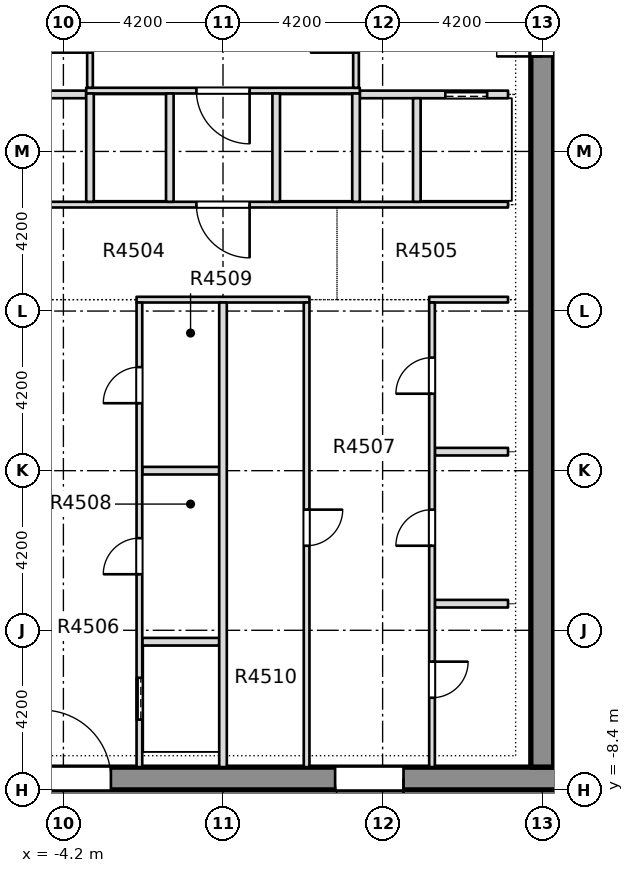
"""IFC4 building model, lengths in metres.
Left out: names, types, materials, properties, quantities, classifications, styles, units other than length and angle.
Written with IfcOpenShell. Run it as: python <this file> out.ifc"""

import sys

from ifc_helpers import new_model, si_unit, direction, frame, frame_2d, origin, place, context, subcontext, project, spatial, rectangle, extrude, element, fill, save


model = new_model("IFC4")
c1 = context("Model", 3, precision=1e-05, world=origin(), true_north=direction((0.0, 1.0)))
c2 = subcontext(c1, "Body", "Model", "MODEL_VIEW")
j1 = project(units=[si_unit("LENGTHUNIT", "METRE"), si_unit("PLANEANGLEUNIT", "RADIAN")], contexts=[c1])
p1 = place(None, origin())
s1 = spatial("IfcSite", under=j1, at=p1, CompositionType="ELEMENT")
p2 = place(p1, origin())
s2 = spatial("IfcBuilding", under=s1, at=p2, CompositionType="ELEMENT")
p3 = place(p2, frame((0.0, 0.0, 175.55)))
s3 = spatial("IfcBuildingStorey", under=s2, at=p3, CompositionType="ELEMENT", Elevation=175.55)
p4 = place(p3, frame((-12.0, -8.1, -0.4), z_axis=(0.0, 0.0, 1.0), x_axis=(1.0, 0.0, 0.0)))
e1 = element("IfcWall", 1, at=p4, inside=s3, PredefinedType="SHEAR", context=c2, shape_type="SweptSolid", body=[
    extrude(rectangle(XDim=24.0, YDim=0.6, at=frame_2d((12.0, 0.0))), origin(), (0.0, 0.0, 1.0), 3.45),
])
p5 = place(p4, frame((7.25, 0.0, 0.4)))
e2 = element("IfcOpeningElement", 2, at=p5, cuts=e1, PredefinedType="OPENING", context=c2, shape_type="SweptSolid", body=[
    extrude(rectangle(XDim=1.8, YDim=2.1, at=frame_2d((0.9, 1.05))), frame((0.0, 0.31, 0.0), z_axis=(0.0, -1.0, 0.0), x_axis=(1.0, 0.0, 0.0)), (0.0, 0.0, 1.0), 0.62),
])
p6 = place(p4, frame((14.95, 0.0, 0.4)))
e3 = element("IfcOpeningElement", 3, at=p6, cuts=e1, PredefinedType="OPENING", context=c2, shape_type="SweptSolid", body=[
    extrude(rectangle(XDim=1.8, YDim=2.1, at=frame_2d((0.9, 1.05))), frame((0.0, 0.31, 0.0), z_axis=(0.0, -1.0, 0.0), x_axis=(1.0, 0.0, 0.0)), (0.0, 0.0, 1.0), 0.62),
])
p7 = place(p3, frame((8.4, -7.8, -0.4), z_axis=(0.0, 0.0, 1.0), x_axis=(0.0, 1.0, 0.0)))
e4 = element("IfcWall", 4, at=p7, inside=s3, PredefinedType="SHEAR", context=c2, shape_type="SweptSolid", body=[
    extrude(rectangle(XDim=28.95, YDim=0.6, at=frame_2d((14.475, 0.0))), origin(), (0.0, 0.0, 1.0), 3.45),
])
p8 = place(p7, frame((18.7, 0.0, 0.4)))
e5 = element("IfcOpeningElement", 5, at=p8, cuts=e4, PredefinedType="OPENING", context=c2, shape_type="SweptSolid", body=[
    extrude(rectangle(XDim=1.2, YDim=2.1, at=frame_2d((0.6, 1.05))), frame((0.0, 0.31, 0.0), z_axis=(0.0, -1.0, 0.0), x_axis=(1.0, 0.0, 0.0)), (0.0, 0.0, 1.0), 0.62),
])
p9 = place(p3, frame((-2.125, -4.5, 0.0), z_axis=(0.0, 0.0, 1.0), x_axis=(1.0, 0.0, 0.0)))
e6 = element("IfcWall", 6, at=p9, inside=s3, PredefinedType="PARTITIONING", context=c2, shape_type="SweptSolid", body=[
    extrude(rectangle(XDim=2.025, YDim=0.2, at=frame_2d((1.012, 0.0))), origin(), (0.0, 0.0, 1.0), 3.05),
])
p10 = place(p3, frame((5.575, -3.5, 0.0), z_axis=(0.0, 0.0, 1.0), x_axis=(1.0, 0.0, 0.0)))
e7 = element("IfcWall", 7, at=p10, inside=s3, PredefinedType="PARTITIONING", context=c2, shape_type="SweptSolid", body=[
    extrude(rectangle(XDim=1.925, YDim=0.2, at=frame_2d((0.962, 0.0))), origin(), (0.0, 0.0, 1.0), 3.05),
])
p11 = place(p3, frame((-2.125, 0.0, 0.0), z_axis=(0.0, 0.0, 1.0), x_axis=(1.0, 0.0, 0.0)))
e8 = element("IfcWall", 8, at=p11, inside=s3, PredefinedType="PARTITIONING", context=c2, shape_type="SweptSolid", body=[
    extrude(rectangle(XDim=2.025, YDim=0.2, at=frame_2d((1.012, 0.0))), origin(), (0.0, 0.0, 1.0), 3.05),
])
p12 = place(p3, frame((5.575, 0.5, 0.0), z_axis=(0.0, 0.0, 1.0), x_axis=(1.0, 0.0, 0.0)))
e9 = element("IfcWall", 9, at=p12, inside=s3, PredefinedType="PARTITIONING", context=c2, shape_type="SweptSolid", body=[
    extrude(rectangle(XDim=1.925, YDim=0.2, at=frame_2d((0.962, 0.0))), origin(), (0.0, 0.0, 1.0), 3.05),
])
p13 = place(p3, frame((-2.275, 4.5, 0.0), z_axis=(0.0, 0.0, 1.0), x_axis=(1.0, 0.0, 0.0)))
e10 = element("IfcWall", 10, at=p13, inside=s3, PredefinedType="PARTITIONING", context=c2, shape_type="SweptSolid", body=[
    extrude(rectangle(XDim=4.55, YDim=0.15, at=frame_2d((2.275, 0.0))), origin(), (0.0, 0.0, 1.0), 3.05),
])
p14 = place(p3, frame((5.425, 4.5, 0.0), z_axis=(0.0, 0.0, 1.0), x_axis=(1.0, 0.0, 0.0)))
e11 = element("IfcWall", 11, at=p14, inside=s3, PredefinedType="PARTITIONING", context=c2, shape_type="SweptSolid", body=[
    extrude(rectangle(XDim=2.075, YDim=0.15, at=frame_2d((1.038, 0.0))), origin(), (0.0, 0.0, 1.0), 3.05),
])
p15 = place(p3, frame((-7.5, 7.0, 0.0), z_axis=(0.0, 0.0, 1.0), x_axis=(1.0, 0.0, 0.0)))
e12 = element("IfcWall", 12, at=p15, inside=s3, PredefinedType="PARTITIONING", context=c2, shape_type="SweptSolid", body=[
    extrude(rectangle(XDim=15.0, YDim=0.15, at=frame_2d((7.5, 0.0))), origin(), (0.0, 0.0, 1.0), 3.05),
])
p16 = place(p15, frame((6.8, 0.0, 0.0)))
e13 = element("IfcOpeningElement", 13, at=p16, cuts=e12, PredefinedType="OPENING", context=c2, shape_type="SweptSolid", body=[
    extrude(rectangle(XDim=1.4, YDim=2.1, at=frame_2d((0.7, 1.05))), frame((0.0, 0.085, 0.0), z_axis=(0.0, -1.0, 0.0), x_axis=(1.0, 0.0, 0.0)), (0.0, 0.0, 1.0), 0.17),
])
p17 = place(p3, frame((-7.5, 9.9, 0.0), z_axis=(0.0, 0.0, 1.0), x_axis=(1.0, 0.0, 0.0)))
e14 = element("IfcWall", 14, at=p17, inside=s3, PredefinedType="PARTITIONING", context=c2, shape_type="SweptSolid", body=[
    extrude(rectangle(XDim=3.9, YDim=0.2, at=frame_2d((1.95, 0.0))), origin(), (0.0, 0.0, 1.0), 3.05),
])
p18 = place(p17, frame((0.55, 0.0, 0.0)))
e15 = element("IfcOpeningElement", 15, at=p18, cuts=e14, PredefinedType="OPENING", context=c2, shape_type="SweptSolid", body=[
    extrude(rectangle(XDim=1.1, YDim=2.1, at=frame_2d((0.55, 1.05))), frame((0.0, 0.11, 0.0), z_axis=(0.0, -1.0, 0.0), x_axis=(1.0, 0.0, 0.0)), (0.0, 0.0, 1.0), 0.22),
])
p19 = place(p3, frame((3.6, 9.9, 0.0), z_axis=(0.0, 0.0, 1.0), x_axis=(1.0, 0.0, 0.0)))
e16 = element("IfcWall", 16, at=p19, inside=s3, PredefinedType="PARTITIONING", context=c2, shape_type="SweptSolid", body=[
    extrude(rectangle(XDim=3.9, YDim=0.2, at=frame_2d((1.95, 0.0))), origin(), (0.0, 0.0, 1.0), 3.05),
])
p20 = place(p19, frame((2.25, 0.0, 0.0)))
e17 = element("IfcOpeningElement", 17, at=p20, cuts=e16, PredefinedType="OPENING", context=c2, shape_type="SweptSolid", body=[
    extrude(rectangle(XDim=1.1, YDim=2.1, at=frame_2d((0.55, 1.05))), frame((0.0, 0.11, 0.0), z_axis=(0.0, -1.0, 0.0), x_axis=(1.0, 0.0, 0.0)), (0.0, 0.0, 1.0), 0.22),
])
p21 = place(p3, frame((-3.6, 10.0, 0.0), z_axis=(0.0, 0.0, 1.0), x_axis=(1.0, 0.0, 0.0)))
e18 = element("IfcWall", 18, at=p21, inside=s3, PredefinedType="PARTITIONING", context=c2, shape_type="SweptSolid", body=[
    extrude(rectangle(XDim=7.2, YDim=0.15, at=frame_2d((3.6, 0.0))), origin(), (0.0, 0.0, 1.0), 3.05),
])
p22 = place(p21, frame((2.9, 0.0, 0.0)))
e19 = element("IfcOpeningElement", 19, at=p22, cuts=e18, PredefinedType="OPENING", context=c2, shape_type="SweptSolid", body=[
    extrude(rectangle(XDim=1.4, YDim=2.1, at=frame_2d((0.7, 1.05))), frame((0.0, 0.085, 0.0), z_axis=(0.0, -1.0, 0.0), x_axis=(1.0, 0.0, 0.0)), (0.0, 0.0, 1.0), 0.17),
])
p23 = place(p3, frame((-3.5, 7.075, 0.0), z_axis=(0.0, 0.0, 1.0), x_axis=(0.0, 1.0, 0.0)))
e20 = element("IfcWall", 20, at=p23, inside=s3, PredefinedType="PARTITIONING", context=c2, shape_type="SweptSolid", body=[
    extrude(rectangle(XDim=2.85, YDim=0.2, at=frame_2d((1.425, 0.0))), origin(), (0.0, 0.0, 1.0), 3.05),
])
p24 = place(p3, frame((-3.5, 10.075, 0.0), z_axis=(0.0, 0.0, 1.0), x_axis=(0.0, 1.0, 0.0)))
e21 = element("IfcWall", 21, at=p24, inside=s3, PredefinedType="PARTITIONING", context=c2, shape_type="SweptSolid", body=[
    extrude(rectangle(XDim=3.075, YDim=0.15, at=frame_2d((1.538, 0.0))), origin(), (0.0, 0.0, 1.0), 3.05),
])
p25 = place(p24, frame((0.925, 0.0, 0.0)))
e22 = element("IfcOpeningElement", 22, at=p25, cuts=e21, PredefinedType="OPENING", context=c2, shape_type="SweptSolid", body=[
    extrude(rectangle(XDim=1.2, YDim=2.1, at=frame_2d((0.6, 1.05))), frame((0.0, 0.085, 0.0), z_axis=(0.0, -1.0, 0.0), x_axis=(1.0, 0.0, 0.0)), (0.0, 0.0, 1.0), 0.17),
])
p26 = place(p3, frame((-2.2, -7.799, 0.0), z_axis=(0.0, 0.0, 1.0), x_axis=(0.0, 1.0, 0.0)))
e23 = element("IfcWall", 23, at=p26, inside=s3, PredefinedType="PARTITIONING", context=c2, shape_type="SweptSolid", body=[
    extrude(rectangle(XDim=12.224, YDim=0.15, at=frame_2d((6.112, 0.0))), origin(), (0.0, 0.0, 1.0), 3.05),
])
p27 = place(p26, frame((1.249, 0.0, 0.0)))
e24 = element("IfcOpeningElement", 24, at=p27, cuts=e23, PredefinedType="OPENING", context=c2, shape_type="SweptSolid", body=[
    extrude(rectangle(XDim=1.1, YDim=2.1, at=frame_2d((0.55, 1.05))), frame((0.0, 0.085, 0.0), z_axis=(0.0, -1.0, 0.0), x_axis=(1.0, 0.0, 0.0)), (0.0, 0.0, 1.0), 0.17),
])
p28 = place(p26, frame((5.074, 0.0, 0.0)))
e25 = element("IfcOpeningElement", 25, at=p28, cuts=e23, PredefinedType="OPENING", context=c2, shape_type="SweptSolid", body=[
    extrude(rectangle(XDim=0.95, YDim=2.1, at=frame_2d((0.475, 1.05))), frame((0.0, 0.085, 0.0), z_axis=(0.0, -1.0, 0.0), x_axis=(1.0, 0.0, 0.0)), (0.0, 0.0, 1.0), 0.17),
])
p29 = place(p26, frame((9.574, 0.0, 0.0)))
e26 = element("IfcOpeningElement", 26, at=p29, cuts=e23, PredefinedType="OPENING", context=c2, shape_type="SweptSolid", body=[
    extrude(rectangle(XDim=0.95, YDim=2.1, at=frame_2d((0.475, 1.05))), frame((0.0, 0.085, 0.0), z_axis=(0.0, -1.0, 0.0), x_axis=(1.0, 0.0, 0.0)), (0.0, 0.0, 1.0), 0.17),
])
p30 = place(p3, frame((-1.4, 7.075, 0.0), z_axis=(0.0, 0.0, 1.0), x_axis=(0.0, 1.0, 0.0)))
e27 = element("IfcWall", 27, at=p30, inside=s3, PredefinedType="PARTITIONING", context=c2, shape_type="SweptSolid", body=[
    extrude(rectangle(XDim=2.85, YDim=0.2, at=frame_2d((1.425, 0.0))), origin(), (0.0, 0.0, 1.0), 3.05),
])
p31 = place(p3, frame((0.0, -7.799, 0.0), z_axis=(0.0, 0.0, 1.0), x_axis=(0.0, 1.0, 0.0)))
e28 = element("IfcWall", 28, at=p31, inside=s3, PredefinedType="PARTITIONING", context=c2, shape_type="SweptSolid", body=[
    extrude(rectangle(XDim=12.224, YDim=0.2, at=frame_2d((6.112, 0.0))), origin(), (0.0, 0.0, 1.0), 3.05),
])
p32 = place(p3, frame((1.4, 7.075, 0.0), z_axis=(0.0, 0.0, 1.0), x_axis=(0.0, 1.0, 0.0)))
e29 = element("IfcWall", 29, at=p32, inside=s3, PredefinedType="PARTITIONING", context=c2, shape_type="SweptSolid", body=[
    extrude(rectangle(XDim=2.85, YDim=0.2, at=frame_2d((1.425, 0.0))), origin(), (0.0, 0.0, 1.0), 3.05),
])
p33 = place(p3, frame((2.2, -7.799, 0.0), z_axis=(0.0, 0.0, 1.0), x_axis=(0.0, 1.0, 0.0)))
e30 = element("IfcWall", 30, at=p33, inside=s3, PredefinedType="PARTITIONING", context=c2, shape_type="SweptSolid", body=[
    extrude(rectangle(XDim=12.224, YDim=0.15, at=frame_2d((6.112, 0.0))), origin(), (0.0, 0.0, 1.0), 3.05),
])
p34 = place(p33, frame((5.824, 0.0, 0.0)))
e31 = element("IfcOpeningElement", 31, at=p34, cuts=e30, PredefinedType="OPENING", context=c2, shape_type="SweptSolid", body=[
    extrude(rectangle(XDim=0.95, YDim=2.1, at=frame_2d((0.475, 1.05))), frame((0.0, 0.085, 0.0), z_axis=(0.0, -1.0, 0.0), x_axis=(1.0, 0.0, 0.0)), (0.0, 0.0, 1.0), 0.17),
])
p35 = place(p3, frame((3.5, 7.075, 0.0), z_axis=(0.0, 0.0, 1.0), x_axis=(0.0, 1.0, 0.0)))
e32 = element("IfcWall", 32, at=p35, inside=s3, PredefinedType="PARTITIONING", context=c2, shape_type="SweptSolid", body=[
    extrude(rectangle(XDim=2.85, YDim=0.2, at=frame_2d((1.425, 0.0))), origin(), (0.0, 0.0, 1.0), 3.05),
])
p36 = place(p3, frame((3.5, 10.075, 0.0), z_axis=(0.0, 0.0, 1.0), x_axis=(0.0, 1.0, 0.0)))
e33 = element("IfcWall", 33, at=p36, inside=s3, PredefinedType="PARTITIONING", context=c2, shape_type="SweptSolid", body=[
    extrude(rectangle(XDim=3.075, YDim=0.15, at=frame_2d((1.538, 0.0))), origin(), (0.0, 0.0, 1.0), 3.05),
])
p37 = place(p36, frame((0.925, 0.0, 0.0)))
e34 = element("IfcOpeningElement", 34, at=p37, cuts=e33, PredefinedType="OPENING", context=c2, shape_type="SweptSolid", body=[
    extrude(rectangle(XDim=1.2, YDim=2.1, at=frame_2d((0.6, 1.05))), frame((0.0, 0.085, 0.0), z_axis=(0.0, -1.0, 0.0), x_axis=(1.0, 0.0, 0.0)), (0.0, 0.0, 1.0), 0.17),
])
p38 = place(p3, frame((5.1, 7.075, 0.0), z_axis=(0.0, 0.0, 1.0), x_axis=(0.0, 1.0, 0.0)))
e35 = element("IfcWall", 35, at=p38, inside=s3, PredefinedType="PARTITIONING", context=c2, shape_type="SweptSolid", body=[
    extrude(rectangle(XDim=2.725, YDim=0.2, at=frame_2d((1.363, 0.0))), origin(), (0.0, 0.0, 1.0), 3.05),
])
p39 = place(p3, frame((5.5, -7.799, 0.0), z_axis=(0.0, 0.0, 1.0), x_axis=(0.0, 1.0, 0.0)))
e36 = element("IfcWall", 36, at=p39, inside=s3, PredefinedType="PARTITIONING", context=c2, shape_type="SweptSolid", body=[
    extrude(rectangle(XDim=12.224, YDim=0.15, at=frame_2d((6.112, 0.0))), origin(), (0.0, 0.0, 1.0), 3.05),
])
p40 = place(p39, frame((1.824, 0.0, 0.0)))
e37 = element("IfcOpeningElement", 37, at=p40, cuts=e36, PredefinedType="OPENING", context=c2, shape_type="SweptSolid", body=[
    extrude(rectangle(XDim=0.95, YDim=2.1, at=frame_2d((0.475, 1.05))), frame((0.0, 0.085, 0.0), z_axis=(0.0, -1.0, 0.0), x_axis=(1.0, 0.0, 0.0)), (0.0, 0.0, 1.0), 0.17),
])
p41 = place(p39, frame((5.824, 0.0, 0.0)))
e38 = element("IfcOpeningElement", 38, at=p41, cuts=e36, PredefinedType="OPENING", context=c2, shape_type="SweptSolid", body=[
    extrude(rectangle(XDim=0.95, YDim=2.1, at=frame_2d((0.475, 1.05))), frame((0.0, 0.085, 0.0), z_axis=(0.0, -1.0, 0.0), x_axis=(1.0, 0.0, 0.0)), (0.0, 0.0, 1.0), 0.17),
])
p42 = place(p39, frame((9.824, 0.0, 0.0)))
e39 = element("IfcOpeningElement", 39, at=p42, cuts=e36, PredefinedType="OPENING", context=c2, shape_type="SweptSolid", body=[
    extrude(rectangle(XDim=0.95, YDim=2.1, at=frame_2d((0.475, 1.05))), frame((0.0, 0.085, 0.0), z_axis=(0.0, -1.0, 0.0), x_axis=(1.0, 0.0, 0.0)), (0.0, 0.0, 1.0), 0.17),
])
p43 = place(p27, origin())
e40 = element("IfcDoor", 40, at=p43, inside=s3, OperationType="SLIDING_TO_LEFT", PredefinedType="DOOR", context=c2, shape_type="SweptSolid", body=[
    extrude(rectangle(XDim=1.1, YDim=2.1, at=frame_2d((0.55, 1.05))), frame((0.0, 0.025, 0.0), z_axis=(0.0, -1.0, 0.0), x_axis=(1.0, 0.0, 0.0)), (0.0, 0.0, 1.0), 0.05),
])
fill(e24, e40)
p44 = place(p28, origin())
e41 = element("IfcDoor", 41, at=p44, inside=s3, OperationType="SINGLE_SWING_LEFT", PredefinedType="DOOR", context=c2, shape_type="SweptSolid", body=[
    extrude(rectangle(XDim=0.95, YDim=2.1, at=frame_2d((0.475, 1.05))), frame((0.0, 0.025, 0.0), z_axis=(0.0, -1.0, 0.0), x_axis=(1.0, 0.0, 0.0)), (0.0, 0.0, 1.0), 0.05),
])
fill(e25, e41)
p45 = place(p29, origin())
e42 = element("IfcDoor", 42, at=p45, inside=s3, OperationType="SINGLE_SWING_RIGHT", PredefinedType="DOOR", context=c2, shape_type="SweptSolid", body=[
    extrude(rectangle(XDim=0.95, YDim=2.1, at=frame_2d((0.475, 1.05))), frame((0.0, 0.025, 0.0), z_axis=(0.0, -1.0, 0.0), x_axis=(1.0, 0.0, 0.0)), (0.0, 0.0, 1.0), 0.05),
])
fill(e26, e42)
p46 = place(p34, origin())
e43 = element("IfcDoor", 43, at=p46, inside=s3, OperationType="SINGLE_SWING_RIGHT", PredefinedType="DOOR", context=c2, shape_type="SweptSolid", body=[
    extrude(rectangle(XDim=0.95, YDim=2.1, at=frame_2d((0.475, 1.05))), frame((0.0, 0.025, 0.0), z_axis=(0.0, -1.0, 0.0), x_axis=(1.0, 0.0, 0.0)), (0.0, 0.0, 1.0), 0.05),
])
fill(e31, e43)
p47 = place(p40, origin())
e44 = element("IfcDoor", 44, at=p47, inside=s3, OperationType="SINGLE_SWING_LEFT", PredefinedType="DOOR", context=c2, shape_type="SweptSolid", body=[
    extrude(rectangle(XDim=0.95, YDim=2.1, at=frame_2d((0.475, 1.05))), frame((0.0, 0.025, 0.0), z_axis=(0.0, -1.0, 0.0), x_axis=(1.0, 0.0, 0.0)), (0.0, 0.0, 1.0), 0.05),
])
fill(e37, e44)
p48 = place(p41, origin())
e45 = element("IfcDoor", 45, at=p48, inside=s3, OperationType="SINGLE_SWING_LEFT", PredefinedType="DOOR", context=c2, shape_type="SweptSolid", body=[
    extrude(rectangle(XDim=0.95, YDim=2.1, at=frame_2d((0.475, 1.05))), frame((0.0, 0.025, 0.0), z_axis=(0.0, -1.0, 0.0), x_axis=(1.0, 0.0, 0.0)), (0.0, 0.0, 1.0), 0.05),
])
fill(e38, e45)
p49 = place(p42, origin())
e46 = element("IfcDoor", 46, at=p49, inside=s3, OperationType="SINGLE_SWING_RIGHT", PredefinedType="DOOR", context=c2, shape_type="SweptSolid", body=[
    extrude(rectangle(XDim=0.95, YDim=2.1, at=frame_2d((0.475, 1.05))), frame((0.0, 0.025, 0.0), z_axis=(0.0, -1.0, 0.0), x_axis=(1.0, 0.0, 0.0)), (0.0, 0.0, 1.0), 0.05),
])
fill(e39, e46)
p50 = place(p20, origin())
e47 = element("IfcDoor", 47, at=p50, inside=s3, OperationType="SLIDING_TO_LEFT", PredefinedType="DOOR", context=c2, shape_type="SweptSolid", body=[
    extrude(rectangle(XDim=1.1, YDim=2.1, at=frame_2d((0.55, 1.05))), frame((0.0, 0.025, 0.0), z_axis=(0.0, -1.0, 0.0), x_axis=(1.0, 0.0, 0.0)), (0.0, 0.0, 1.0), 0.05),
])
fill(e17, e47)
p51 = place(p16, origin())
e48 = element("IfcDoor", 48, at=p51, inside=s3, OperationType="SINGLE_SWING_RIGHT", PredefinedType="DOOR", context=c2, shape_type="SweptSolid", body=[
    extrude(rectangle(XDim=1.4, YDim=2.1, at=frame_2d((0.7, 1.05))), frame((0.0, 0.025, 0.0), z_axis=(0.0, -1.0, 0.0), x_axis=(1.0, 0.0, 0.0)), (0.0, 0.0, 1.0), 0.05),
])
fill(e13, e48)
p52 = place(p22, origin())
e49 = element("IfcDoor", 49, at=p52, inside=s3, OperationType="SINGLE_SWING_RIGHT", PredefinedType="DOOR", context=c2, shape_type="SweptSolid", body=[
    extrude(rectangle(XDim=1.4, YDim=2.1, at=frame_2d((0.7, 1.05))), frame((0.0, 0.025, 0.0), z_axis=(0.0, -1.0, 0.0), x_axis=(1.0, 0.0, 0.0)), (0.0, 0.0, 1.0), 0.05),
])
fill(e19, e49)
p53 = place(p5, origin())
e50 = element("IfcDoor", 50, at=p53, inside=s3, OperationType="SINGLE_SWING_LEFT", PredefinedType="DOOR", context=c2, shape_type="SweptSolid", body=[
    extrude(rectangle(XDim=1.8, YDim=2.1, at=frame_2d((0.9, 1.05))), frame((0.0, 0.025, 0.0), z_axis=(0.0, -1.0, 0.0), x_axis=(1.0, 0.0, 0.0)), (0.0, 0.0, 1.0), 0.05),
])
fill(e2, e50)
p54 = place(p6, origin())
e51 = element("IfcDoor", 51, at=p54, inside=s3, OperationType="SINGLE_SWING_LEFT", PredefinedType="DOOR", context=c2, shape_type="SweptSolid", body=[
    extrude(rectangle(XDim=1.8, YDim=2.1, at=frame_2d((0.9, 1.05))), frame((0.0, 0.025, 0.0), z_axis=(0.0, -1.0, 0.0), x_axis=(1.0, 0.0, 0.0)), (0.0, 0.0, 1.0), 0.05),
])
fill(e3, e51)
p55 = place(p8, origin())
e52 = element("IfcDoor", 52, at=p55, inside=s3, OperationType="SINGLE_SWING_LEFT", PredefinedType="DOOR", context=c2, shape_type="SweptSolid", body=[
    extrude(rectangle(XDim=1.2, YDim=2.1, at=frame_2d((0.6, 1.05))), frame((0.0, 0.025, 0.0), z_axis=(0.0, -1.0, 0.0), x_axis=(1.0, 0.0, 0.0)), (0.0, 0.0, 1.0), 0.05),
])
fill(e5, e52)
save(model, sys.argv[1])
